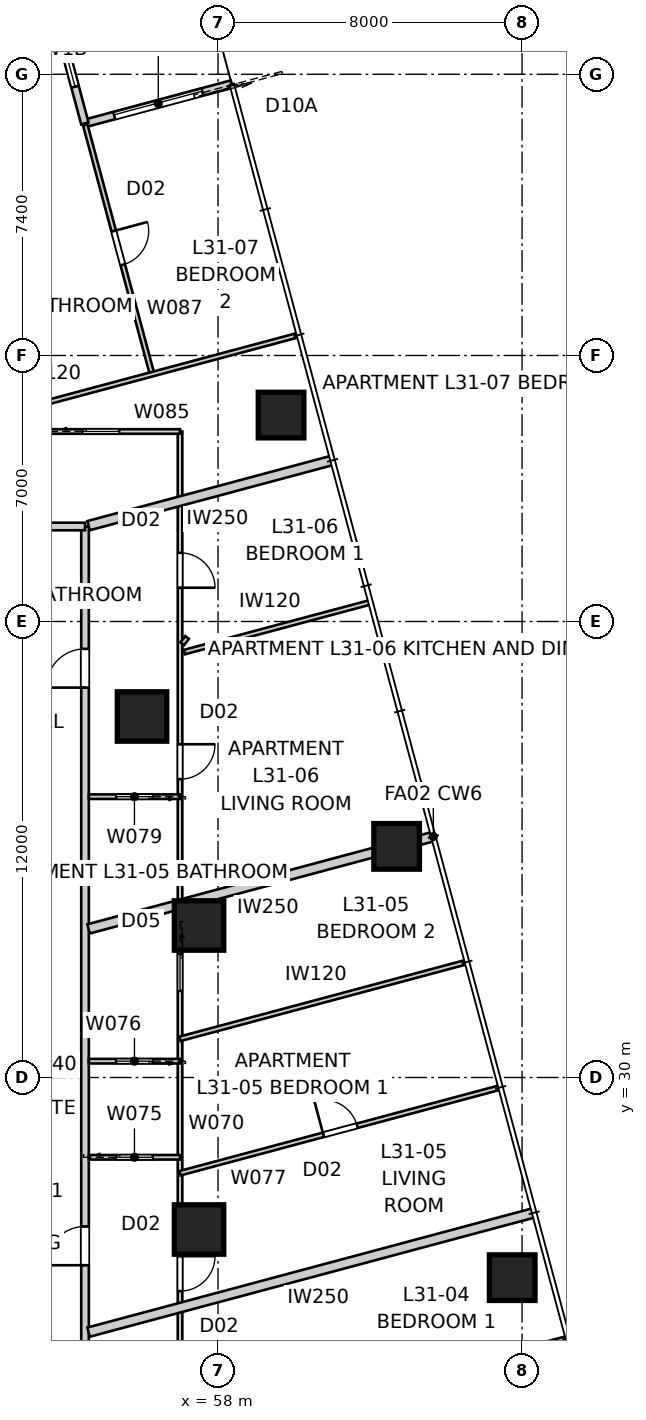
"""IFC4 building model, lengths in metres.
Left out: names, types, materials, properties, quantities, classifications, styles, units other than length and angle.
Written with IfcOpenShell. Run it as: python <this file> out.ifc"""

import sys

from ifc_helpers import new_model, si_unit, direction, frame, frame_2d, origin, origin_2d, place, context, subcontext, project, spatial, rectangle, extrude, element, fill, save


model = new_model("IFC4")
c1 = context("Model", 3, precision=1e-05, world=origin(), true_north=direction((0.0, 1.0)))
c2 = subcontext(c1, "Body", "Model", "MODEL_VIEW")
j1 = project(units=[si_unit("LENGTHUNIT", "METRE"), si_unit("PLANEANGLEUNIT", "RADIAN")], contexts=[c1])
p1 = place(None, origin())
s1 = spatial("IfcSite", under=j1, at=p1, CompositionType="ELEMENT")
p2 = place(p1, origin())
s2 = spatial("IfcBuilding", under=s1, at=p2, CompositionType="ELEMENT")
p3 = place(p2, frame((0.0, 0.0, 115.0)))
s3 = spatial("IfcBuildingStorey", under=s2, at=p3, CompositionType="ELEMENT", Elevation=115.0)
for number, where, z_axis, x_axis in (
    (1, (65.74, 24.733, 0.0), (0.0, 0.0, 1.0), (1.0, 0.0, 0.0)),
    (2, (62.699, 36.082, 0.0), (0.0, 0.0, 1.0), (1.0, 0.0, 0.0)),
    (3, (59.658, 47.432, 0.0), (0.0, 0.0, 1.0), (1.0, 0.0, 0.0)),
):
    element("IfcColumn", number, at=place(p3, frame(where, z_axis=z_axis, x_axis=x_axis)), inside=s3, PredefinedType="COLUMN", context=c2, shape_type="SweptSolid", body=[
        extrude(rectangle(XDim=1.2, YDim=1.2, at=origin_2d()), origin(), (0.0, 0.0, 1.0), 3.4),
    ])
for number, where, z_axis, x_axis in (
    (4, (57.5, 26.0, 0.0), (0.0, 0.0, 1.0), (1.0, 0.0, 0.0)),
    (5, (57.5, 34.0, 0.0), (0.0, 0.0, 1.0), (1.0, 0.0, 0.0)),
    (6, (56.0, 39.5, 0.0), (0.0, 0.0, 1.0), (1.0, 0.0, 0.0)),
):
    element("IfcColumn", number, at=place(p3, frame(where, z_axis=z_axis, x_axis=x_axis)), inside=s3, PredefinedType="COLUMN", context=c2, shape_type="SweptSolid", body=[
        extrude(rectangle(XDim=1.3, YDim=1.3, at=origin_2d()), origin(), (0.0, 0.0, 1.0), 3.4),
    ])
p4 = place(p3, frame((58.359, 56.143, 0.0), z_axis=(0.0, 0.0, 1.0), x_axis=(-0.965919172068, -0.258843877716, 0.0)))
e7 = element("IfcWall", 7, at=p4, inside=s3, PredefinedType="SOLIDWALL", context=c2, shape_type="SweptSolid", body=[
    extrude(rectangle(XDim=4.0, YDim=0.2, at=frame_2d((2.0, 0.0))), origin(), (0.0, 0.0, 1.0), 3.25),
])
p5 = place(p4, frame((0.8, 0.0, 0.0)))
e8 = element("IfcOpeningElement", 8, at=p5, cuts=e7, PredefinedType="OPENING", context=c2, shape_type="SweptSolid", body=[
    extrude(rectangle(XDim=2.4, YDim=2.1, at=frame_2d((1.2, 1.05))), frame((0.0, 0.11, 0.0), z_axis=(0.0, -1.0, 0.0), x_axis=(1.0, 0.0, 0.0)), (0.0, 0.0, 1.0), 0.22),
])
p6 = place(p3, frame((54.496, 55.107, 0.0), z_axis=(0.0, 0.0, 1.0), x_axis=(-0.258786931944, 0.965934430412, 0.0)))
e9 = element("IfcWall", 9, at=p6, inside=s3, PredefinedType="SOLIDWALL", context=c2, shape_type="SweptSolid", body=[
    extrude(rectangle(XDim=4.0, YDim=0.2, at=frame_2d((2.0, 0.0))), origin(), (0.0, 0.0, 1.0), 3.25),
])
p7 = place(p6, frame((1.0, 0.0, 0.45)))
e10 = element("IfcOpeningElement", 10, at=p7, cuts=e9, PredefinedType="OPENING", context=c2, shape_type="SweptSolid", body=[
    extrude(rectangle(XDim=2.0, YDim=1.8, at=frame_2d((1.0, 0.9))), frame((0.0, 0.11, 0.0), z_axis=(0.0, -1.0, 0.0), x_axis=(1.0, 0.0, 0.0)), (0.0, 0.0, 1.0), 0.22),
])
p8 = place(p3, frame((54.5, 15.5, 0.0), z_axis=(0.0, 0.0, 1.0), x_axis=(0.0, 1.0, 0.0)))
e11 = element("IfcWall", 11, at=p8, inside=s3, PredefinedType="PARTITIONING", context=c2, shape_type="SweptSolid", body=[
    extrude(rectangle(XDim=29.0, YDim=0.2, at=frame_2d((14.5, 0.0))), origin(), (0.0, 0.0, 1.0), 3.25),
])
p9 = place(p8, frame((24.76, 0.0, 0.0)))
e12 = element("IfcOpeningElement", 12, at=p9, cuts=e11, PredefinedType="OPENING", context=c2, shape_type="SweptSolid", body=[
    extrude(rectangle(XDim=1.02, YDim=2.1, at=frame_2d((0.51, 1.05))), frame((0.0, 0.11, 0.0), z_axis=(0.0, -1.0, 0.0), x_axis=(1.0, 0.0, 0.0)), (0.0, 0.0, 1.0), 0.22),
])
p10 = place(p8, frame((5.829, 0.0, 0.0)))
e13 = element("IfcOpeningElement", 13, at=p10, cuts=e11, PredefinedType="OPENING", context=c2, shape_type="SweptSolid", body=[
    extrude(rectangle(XDim=1.02, YDim=2.34, at=frame_2d((0.51, 1.17))), frame((0.0, 0.11, 0.0), z_axis=(0.0, -1.0, 0.0), x_axis=(1.0, 0.0, 0.0)), (0.0, 0.0, 1.0), 0.22),
])
p11 = place(p8, frame((9.559, 0.0, 0.0)))
e14 = element("IfcOpeningElement", 14, at=p11, cuts=e11, PredefinedType="OPENING", context=c2, shape_type="SweptSolid", body=[
    extrude(rectangle(XDim=1.02, YDim=2.34, at=frame_2d((0.51, 1.17))), frame((0.0, 0.11, 0.0), z_axis=(0.0, -1.0, 0.0), x_axis=(1.0, 0.0, 0.0)), (0.0, 0.0, 1.0), 0.22),
])
p12 = place(p3, frame((54.5, 44.5, 0.0), z_axis=(0.0, 0.0, 1.0), x_axis=(-1.0, 0.0, 0.0)))
e15 = element("IfcWall", 15, at=p12, inside=s3, PredefinedType="PARTITIONING", context=c2, shape_type="SweptSolid", body=[
    extrude(rectangle(XDim=28.2, YDim=0.2, at=frame_2d((14.1, 0.0))), origin(), (0.0, 0.0, 1.0), 3.25),
])
p13 = place(p12, frame((10.837, 0.0, 0.0)))
e16 = element("IfcOpeningElement", 16, at=p13, cuts=e15, PredefinedType="OPENING", context=c2, shape_type="SweptSolid", body=[
    extrude(rectangle(XDim=1.02, YDim=2.34, at=frame_2d((0.51, 1.17))), frame((0.0, 0.11, 0.0), z_axis=(0.0, -1.0, 0.0), x_axis=(1.0, 0.0, 0.0)), (0.0, 0.0, 1.0), 0.22),
])
p14 = place(p12, frame((5.7, 0.0, 0.0)))
e17 = element("IfcOpeningElement", 17, at=p14, cuts=e15, PredefinedType="OPENING", context=c2, shape_type="SweptSolid", body=[
    extrude(rectangle(XDim=1.02, YDim=2.34, at=frame_2d((0.51, 1.17))), frame((0.0, 0.11, 0.0), z_axis=(0.0, -1.0, 0.0), x_axis=(1.0, 0.0, 0.0)), (0.0, 0.0, 1.0), 0.22),
])
p15 = place(p12, frame((26.127, 0.0, 0.0)))
e18 = element("IfcOpeningElement", 18, at=p15, cuts=e15, PredefinedType="OPENING", context=c2, shape_type="SweptSolid", body=[
    extrude(rectangle(XDim=1.02, YDim=2.34, at=frame_2d((0.51, 1.17))), frame((0.0, 0.11, 0.0), z_axis=(0.0, -1.0, 0.0), x_axis=(1.0, 0.0, 0.0)), (0.0, 0.0, 1.0), 0.22),
])
p16 = place(p3, frame((63.665, 36.341, 0.0), z_axis=(0.0, 0.0, 1.0), x_axis=(-0.965927049013, -0.258814481793, 0.0)))
e19 = element("IfcWall", 19, at=p16, inside=s3, PredefinedType="PARTITIONING", context=c2, shape_type="SweptSolid", body=[
    extrude(rectangle(XDim=9.392, YDim=0.25, at=frame_2d((4.696, 0.0))), origin(), (0.0, 0.0, 1.0), 3.25),
])
p17 = place(p3, frame((66.318, 26.44, 0.0), z_axis=(0.0, 0.0, 1.0), x_axis=(-0.965924438766, -0.258824223352, 0.0)))
e20 = element("IfcWall", 20, at=p17, inside=s3, PredefinedType="PARTITIONING", context=c2, shape_type="SweptSolid", body=[
    extrude(rectangle(XDim=12.138, YDim=0.25, at=frame_2d((6.069, 0.0))), origin(), (0.0, 0.0, 1.0), 3.25),
])
p18 = place(p3, frame((61.012, 46.242, 0.0), z_axis=(0.0, 0.0, 1.0), x_axis=(-0.965929355837, -0.25880587229, 0.0)))
e21 = element("IfcWall", 21, at=p18, inside=s3, PredefinedType="PARTITIONING", context=c2, shape_type="SweptSolid", body=[
    extrude(rectangle(XDim=6.645, YDim=0.25, at=frame_2d((3.322, 0.0))), origin(), (0.0, 0.0, 1.0), 3.25),
])
p19 = place(p3, frame((57.0, 47.0, 0.0), z_axis=(0.0, 0.0, 1.0), x_axis=(0.0, -1.0, 0.0)))
e22 = element("IfcWall", 22, at=p19, inside=s3, PredefinedType="PARTITIONING", context=c2, shape_type="SweptSolid", body=[
    extrude(rectangle(XDim=34.0, YDim=0.12, at=frame_2d((17.0, 0.0))), origin(), (0.0, 0.0, 1.0), 2.55),
])
p20 = place(p19, frame((8.23, 0.0, 0.0)))
e23 = element("IfcOpeningElement", 23, at=p20, cuts=e22, PredefinedType="OPENING", context=c2, shape_type="SweptSolid", body=[
    extrude(rectangle(XDim=0.92, YDim=2.34, at=frame_2d((0.46, 1.17))), frame((0.0, 0.07, 0.0), z_axis=(0.0, -1.0, 0.0), x_axis=(1.0, 0.0, 0.0)), (0.0, 0.0, 1.0), 0.14),
])
p21 = place(p19, frame((3.192, 0.0, 0.0)))
e24 = element("IfcOpeningElement", 24, at=p21, cuts=e22, PredefinedType="OPENING", context=c2, shape_type="SweptSolid", body=[
    extrude(rectangle(XDim=0.92, YDim=2.34, at=frame_2d((0.46, 1.17))), frame((0.0, 0.07, 0.0), z_axis=(0.0, -1.0, 0.0), x_axis=(1.0, 0.0, 0.0)), (0.0, 0.0, 1.0), 0.14),
])
p22 = place(p19, frame((24.391, 0.0, 0.0)))
e25 = element("IfcOpeningElement", 25, at=p22, cuts=e22, PredefinedType="OPENING", context=c2, shape_type="SweptSolid", body=[
    extrude(rectangle(XDim=0.92, YDim=2.34, at=frame_2d((0.46, 1.17))), frame((0.0, 0.07, 0.0), z_axis=(0.0, -1.0, 0.0), x_axis=(1.0, 0.0, 0.0)), (0.0, 0.0, 1.0), 0.14),
])
p23 = place(p19, frame((21.702, 0.0, 0.0)))
e26 = element("IfcOpeningElement", 26, at=p23, cuts=e22, PredefinedType="OPENING", context=c2, shape_type="SweptSolid", body=[
    extrude(rectangle(XDim=0.92, YDim=2.34, at=frame_2d((0.46, 1.17))), frame((0.0, 0.07, 0.0), z_axis=(0.0, -1.0, 0.0), x_axis=(1.0, 0.0, 0.0)), (0.0, 0.0, 1.0), 0.14),
])
p24 = place(p19, frame((31.459, 0.0, 0.0)))
e27 = element("IfcOpeningElement", 27, at=p24, cuts=e22, PredefinedType="OPENING", context=c2, shape_type="SweptSolid", body=[
    extrude(rectangle(XDim=0.96, YDim=2.1, at=frame_2d((0.48, 1.05))), frame((0.0, 0.07, 0.0), z_axis=(0.0, -1.0, 0.0), x_axis=(1.0, 0.0, 0.0)), (0.0, 0.0, 1.0), 0.14),
])
p25 = place(p19, frame((13.759, 0.0, 0.0)))
e28 = element("IfcOpeningElement", 28, at=p25, cuts=e22, PredefinedType="OPENING", context=c2, shape_type="SweptSolid", body=[
    extrude(rectangle(XDim=0.96, YDim=2.1, at=frame_2d((0.48, 1.05))), frame((0.0, 0.07, 0.0), z_axis=(0.0, -1.0, 0.0), x_axis=(1.0, 0.0, 0.0)), (0.0, 0.0, 1.0), 0.14),
])
p26 = place(p3, frame((57.0, 20.406, 0.0), z_axis=(0.0, 0.0, 1.0), x_axis=(0.9659257847, 0.258819200315, 0.0)))
e29 = element("IfcWall", 29, at=p26, inside=s3, PredefinedType="PARTITIONING", context=c2, shape_type="SweptSolid", body=[
    extrude(rectangle(XDim=10.522, YDim=0.12, at=frame_2d((5.261, 0.0))), origin(), (0.0, 0.0, 1.0), 2.722),
])
p27 = place(p26, frame((4.821, 0.0, 0.0)))
e30 = element("IfcOpeningElement", 30, at=p27, cuts=e29, PredefinedType="OPENING", context=c2, shape_type="SweptSolid", body=[
    extrude(rectangle(XDim=0.92, YDim=2.34, at=frame_2d((0.46, 1.17))), frame((0.0, 0.07, 0.0), z_axis=(0.0, -1.0, 0.0), x_axis=(1.0, 0.0, 0.0)), (0.0, 0.0, 1.0), 0.14),
])
p28 = place(p3, frame((54.6, 27.901, 0.0), z_axis=(0.0, 0.0, 1.0), x_axis=(1.0, 0.0, 0.0)))
e31 = element("IfcWall", 31, at=p28, inside=s3, PredefinedType="PARTITIONING", context=c2, shape_type="SweptSolid", body=[
    extrude(rectangle(XDim=2.4, YDim=0.12, at=frame_2d((1.2, 0.0))), origin(), (0.0, 0.0, 1.0), 3.25),
])
p29 = place(p28, frame((0.72, 0.0, 0.0)))
e32 = element("IfcOpeningElement", 32, at=p29, cuts=e31, PredefinedType="OPENING", context=c2, shape_type="SweptSolid", body=[
    extrude(rectangle(XDim=0.96, YDim=2.1, at=frame_2d((0.48, 1.05))), frame((0.0, 0.07, 0.0), z_axis=(0.0, -1.0, 0.0), x_axis=(1.0, 0.0, 0.0)), (0.0, 0.0, 1.0), 0.14),
])
p30 = place(p3, frame((57.0, 30.43, 0.0), z_axis=(0.0, 0.0, 1.0), x_axis=(-1.0, 0.0, 0.0)))
e33 = element("IfcWall", 33, at=p30, inside=s3, PredefinedType="PARTITIONING", context=c2, shape_type="SweptSolid", body=[
    extrude(rectangle(XDim=2.4, YDim=0.12, at=frame_2d((1.2, 0.0))), origin(), (0.0, 0.0, 1.0), 3.25),
])
p31 = place(p30, frame((0.72, 0.0, 0.0)))
e34 = element("IfcOpeningElement", 34, at=p31, cuts=e33, PredefinedType="OPENING", context=c2, shape_type="SweptSolid", body=[
    extrude(rectangle(XDim=0.96, YDim=2.1, at=frame_2d((0.48, 1.05))), frame((0.0, 0.07, 0.0), z_axis=(0.0, -1.0, 0.0), x_axis=(1.0, 0.0, 0.0)), (0.0, 0.0, 1.0), 0.14),
])
p32 = place(p3, frame((57.0, 27.481, 0.0), z_axis=(0.0, 0.0, 1.0), x_axis=(0.965925607751, 0.258819860698, 0.0)))
e35 = element("IfcWall", 35, at=p32, inside=s3, PredefinedType="PARTITIONING", context=c2, shape_type="SweptSolid", body=[
    extrude(rectangle(XDim=8.691, YDim=0.12, at=frame_2d((4.346, 0.0))), origin(), (0.0, 0.0, 1.0), 3.25),
])
p33 = place(p32, frame((3.906, 0.0, 0.0)))
e36 = element("IfcOpeningElement", 36, at=p33, cuts=e35, PredefinedType="OPENING", context=c2, shape_type="SweptSolid", body=[
    extrude(rectangle(XDim=0.92, YDim=2.34, at=frame_2d((0.46, 1.17))), frame((0.0, 0.07, 0.0), z_axis=(0.0, -1.0, 0.0), x_axis=(1.0, 0.0, 0.0)), (0.0, 0.0, 1.0), 0.14),
])
p34 = place(p3, frame((57.0, 31.018, 0.0), z_axis=(0.0, 0.0, 1.0), x_axis=(0.965927309482, 0.258813509689, 0.0)))
e37 = element("IfcWall", 37, at=p34, inside=s3, PredefinedType="PARTITIONING", context=c2, shape_type="SweptSolid", body=[
    extrude(rectangle(XDim=7.776, YDim=0.12, at=frame_2d((3.888, 0.0))), origin(), (0.0, 0.0, 1.0), 3.25),
])
p35 = place(p3, frame((57.0, 37.39, 0.0), z_axis=(0.0, 0.0, 1.0), x_axis=(-1.0, 0.0, 0.0)))
e38 = element("IfcWall", 38, at=p35, inside=s3, PredefinedType="PARTITIONING", context=c2, shape_type="SweptSolid", body=[
    extrude(rectangle(XDim=2.4, YDim=0.12, at=frame_2d((1.2, 0.0))), origin(), (0.0, 0.0, 1.0), 3.25),
])
p36 = place(p35, frame((0.72, 0.0, 0.0)))
e39 = element("IfcOpeningElement", 39, at=p36, cuts=e38, PredefinedType="OPENING", context=c2, shape_type="SweptSolid", body=[
    extrude(rectangle(XDim=0.96, YDim=2.1, at=frame_2d((0.48, 1.05))), frame((0.0, 0.07, 0.0), z_axis=(0.0, -1.0, 0.0), x_axis=(1.0, 0.0, 0.0)), (0.0, 0.0, 1.0), 0.14),
])
p37 = place(p3, frame((57.187, 41.58, 0.0), z_axis=(0.0, 0.0, 1.0), x_axis=(-0.609039064162, -0.793140226142, 0.0)))
e40 = element("IfcWall", 40, at=p37, inside=s3, PredefinedType="PARTITIONING", context=c2, shape_type="SweptSolid", body=[
    extrude(rectangle(XDim=0.211, YDim=0.12, at=frame_2d((0.105, 0.0))), origin(), (0.0, 0.0, 1.0), 3.25),
])
p38 = place(p3, frame((57.116, 41.195, 0.0), z_axis=(0.0, 0.0, 1.0), x_axis=(0.965921615375, 0.258834759935, 0.0)))
e41 = element("IfcWall", 41, at=p38, inside=s3, PredefinedType="PARTITIONING", context=c2, shape_type="SweptSolid", body=[
    extrude(rectangle(XDim=5.029, YDim=0.12, at=frame_2d((2.515, 0.0))), origin(), (0.0, 0.0, 1.0), 2.722),
])
p39 = place(p3, frame((50.853, 47.0, 0.0), z_axis=(0.0, 0.0, 1.0), x_axis=(1.0, 0.0, 0.0)))
e42 = element("IfcWall", 42, at=p39, inside=s3, PredefinedType="PARTITIONING", context=c2, shape_type="SweptSolid", body=[
    extrude(rectangle(XDim=6.147, YDim=0.12, at=frame_2d((3.074, 0.0))), origin(), (0.0, 0.0, 1.0), 3.25),
])
p40 = place(p39, frame((3.585, 0.0, 0.0)))
e43 = element("IfcOpeningElement", 43, at=p40, cuts=e42, PredefinedType="OPENING", context=c2, shape_type="SweptSolid", body=[
    extrude(rectangle(XDim=0.96, YDim=2.1, at=frame_2d((0.48, 1.05))), frame((0.0, 0.07, 0.0), z_axis=(0.0, -1.0, 0.0), x_axis=(1.0, 0.0, 0.0)), (0.0, 0.0, 1.0), 0.14),
])
p41 = place(p3, frame((54.506, 55.069, 0.0), z_axis=(0.0, 0.0, 1.0), x_axis=(0.258830095464, -0.965922865286, 0.0)))
e44 = element("IfcWall", 44, at=p41, inside=s3, PredefinedType="PARTITIONING", context=c2, shape_type="SweptSolid", body=[
    extrude(rectangle(XDim=6.793, YDim=0.12, at=frame_2d((3.396, 0.0))), origin(), (0.0, 0.0, 1.0), 3.25),
])
p42 = place(p41, frame((2.892, 0.0, 0.0)))
e45 = element("IfcOpeningElement", 45, at=p42, cuts=e44, PredefinedType="OPENING", context=c2, shape_type="SweptSolid", body=[
    extrude(rectangle(XDim=0.92, YDim=2.34, at=frame_2d((0.46, 1.17))), frame((0.0, 0.07, 0.0), z_axis=(0.0, -1.0, 0.0), x_axis=(1.0, 0.0, 0.0)), (0.0, 0.0, 1.0), 0.14),
])
p43 = place(p3, frame((60.089, 49.532, 0.0), z_axis=(0.0, 0.0, 1.0), x_axis=(-0.965927203676, -0.25881390457, 0.0)))
e46 = element("IfcWall", 46, at=p43, inside=s3, PredefinedType="PARTITIONING", context=c2, shape_type="SweptSolid", body=[
    extrude(rectangle(XDim=9.357, YDim=0.12, at=frame_2d((4.678, 0.0))), origin(), (0.0, 0.0, 1.0), 2.638),
])
p44 = place(p5, origin())
e47 = element("IfcDoor", 47, at=p44, inside=s3, OperationType="SLIDING_TO_LEFT", PredefinedType="DOOR", context=c2, shape_type="SweptSolid", body=[
    extrude(rectangle(XDim=2.4, YDim=2.1, at=frame_2d((1.2, 1.05))), frame((0.0, 0.025, 0.0), z_axis=(0.0, -1.0, 0.0), x_axis=(1.0, 0.0, 0.0)), (0.0, 0.0, 1.0), 0.05),
])
fill(e8, e47)
p45 = place(p7, origin())
e48 = element("IfcWindow", 48, at=p45, inside=s3, PartitioningType="SINGLE_PANEL", PredefinedType="WINDOW", context=c2, shape_type="SweptSolid", body=[
    extrude(rectangle(XDim=2.0, YDim=1.8, at=frame_2d((1.0, 0.9))), frame((0.0, 0.03, 0.0), z_axis=(0.0, -1.0, 0.0), x_axis=(1.0, 0.0, 0.0)), (0.0, 0.0, 1.0), 0.06),
])
fill(e10, e48)
p46 = place(p9, origin())
e49 = element("IfcDoor", 49, at=p46, inside=s3, OperationType="SINGLE_SWING_LEFT", PredefinedType="DOOR", context=c2, shape_type="SweptSolid", body=[
    extrude(rectangle(XDim=1.02, YDim=2.1, at=frame_2d((0.51, 1.05))), frame((0.0, 0.025, 0.0), z_axis=(0.0, -1.0, 0.0), x_axis=(1.0, 0.0, 0.0)), (0.0, 0.0, 1.0), 0.05),
])
fill(e12, e49)
p47 = place(p11, origin())
e50 = element("IfcDoor", 50, at=p47, inside=s3, OperationType="SINGLE_SWING_LEFT", PredefinedType="DOOR", context=c2, shape_type="SweptSolid", body=[
    extrude(rectangle(XDim=1.02, YDim=2.34, at=frame_2d((0.51, 1.17))), frame((0.0, 0.025, 0.0), z_axis=(0.0, -1.0, 0.0), x_axis=(1.0, 0.0, 0.0)), (0.0, 0.0, 1.0), 0.05),
])
fill(e14, e50)
p48 = place(p20, origin())
e51 = element("IfcDoor", 51, at=p48, inside=s3, OperationType="SINGLE_SWING_LEFT", PredefinedType="DOOR", context=c2, shape_type="SweptSolid", body=[
    extrude(rectangle(XDim=0.92, YDim=2.34, at=frame_2d((0.46, 1.17))), frame((0.0, 0.025, 0.0), z_axis=(0.0, -1.0, 0.0), x_axis=(1.0, 0.0, 0.0)), (0.0, 0.0, 1.0), 0.05),
])
fill(e23, e51)
p49 = place(p21, origin())
e52 = element("IfcDoor", 52, at=p49, inside=s3, OperationType="SINGLE_SWING_RIGHT", PredefinedType="DOOR", context=c2, shape_type="SweptSolid", body=[
    extrude(rectangle(XDim=0.92, YDim=2.34, at=frame_2d((0.46, 1.17))), frame((0.0, 0.025, 0.0), z_axis=(0.0, -1.0, 0.0), x_axis=(1.0, 0.0, 0.0)), (0.0, 0.0, 1.0), 0.05),
])
fill(e24, e52)
p50 = place(p36, origin())
e53 = element("IfcDoor", 53, at=p50, inside=s3, OperationType="SLIDING_TO_LEFT", PredefinedType="DOOR", context=c2, shape_type="SweptSolid", body=[
    extrude(rectangle(XDim=0.96, YDim=2.1, at=frame_2d((0.48, 1.05))), frame((0.0, 0.025, 0.0), z_axis=(0.0, -1.0, 0.0), x_axis=(1.0, 0.0, 0.0)), (0.0, 0.0, 1.0), 0.05),
])
fill(e39, e53)
p51 = place(p23, origin())
e54 = element("IfcDoor", 54, at=p51, inside=s3, OperationType="SINGLE_SWING_LEFT", PredefinedType="DOOR", context=c2, shape_type="SweptSolid", body=[
    extrude(rectangle(XDim=0.92, YDim=2.34, at=frame_2d((0.46, 1.17))), frame((0.0, 0.025, 0.0), z_axis=(0.0, -1.0, 0.0), x_axis=(1.0, 0.0, 0.0)), (0.0, 0.0, 1.0), 0.05),
])
fill(e26, e54)
p52 = place(p29, origin())
e55 = element("IfcDoor", 55, at=p52, inside=s3, OperationType="SLIDING_TO_LEFT", PredefinedType="DOOR", context=c2, shape_type="SweptSolid", body=[
    extrude(rectangle(XDim=0.96, YDim=2.1, at=frame_2d((0.48, 1.05))), frame((0.0, 0.025, 0.0), z_axis=(0.0, -1.0, 0.0), x_axis=(1.0, 0.0, 0.0)), (0.0, 0.0, 1.0), 0.05),
])
fill(e32, e55)
p53 = place(p40, origin())
e56 = element("IfcDoor", 56, at=p53, inside=s3, OperationType="SLIDING_TO_LEFT", PredefinedType="DOOR", context=c2, shape_type="SweptSolid", body=[
    extrude(rectangle(XDim=0.96, YDim=2.1, at=frame_2d((0.48, 1.05))), frame((0.0, 0.025, 0.0), z_axis=(0.0, -1.0, 0.0), x_axis=(1.0, 0.0, 0.0)), (0.0, 0.0, 1.0), 0.05),
])
fill(e43, e56)
p54 = place(p33, origin())
e57 = element("IfcDoor", 57, at=p54, inside=s3, OperationType="SINGLE_SWING_LEFT", PredefinedType="DOOR", context=c2, shape_type="SweptSolid", body=[
    extrude(rectangle(XDim=0.92, YDim=2.34, at=frame_2d((0.46, 1.17))), frame((0.0, 0.025, 0.0), z_axis=(0.0, -1.0, 0.0), x_axis=(1.0, 0.0, 0.0)), (0.0, 0.0, 1.0), 0.05),
])
fill(e36, e57)
p55 = place(p31, origin())
e58 = element("IfcDoor", 58, at=p55, inside=s3, OperationType="SLIDING_TO_LEFT", PredefinedType="DOOR", context=c2, shape_type="SweptSolid", body=[
    extrude(rectangle(XDim=0.96, YDim=2.1, at=frame_2d((0.48, 1.05))), frame((0.0, 0.025, 0.0), z_axis=(0.0, -1.0, 0.0), x_axis=(1.0, 0.0, 0.0)), (0.0, 0.0, 1.0), 0.05),
])
fill(e34, e58)
p56 = place(p25, origin())
e59 = element("IfcDoor", 59, at=p56, inside=s3, OperationType="SLIDING_TO_LEFT", PredefinedType="DOOR", context=c2, shape_type="SweptSolid", body=[
    extrude(rectangle(XDim=0.96, YDim=2.1, at=frame_2d((0.48, 1.05))), frame((0.0, 0.025, 0.0), z_axis=(0.0, -1.0, 0.0), x_axis=(1.0, 0.0, 0.0)), (0.0, 0.0, 1.0), 0.05),
])
fill(e28, e59)
p57 = place(p42, origin())
e60 = element("IfcDoor", 60, at=p57, inside=s3, OperationType="SINGLE_SWING_LEFT", PredefinedType="DOOR", context=c2, shape_type="SweptSolid", body=[
    extrude(rectangle(XDim=0.92, YDim=2.34, at=frame_2d((0.46, 1.17))), frame((0.0, 0.025, 0.0), z_axis=(0.0, -1.0, 0.0), x_axis=(1.0, 0.0, 0.0)), (0.0, 0.0, 1.0), 0.05),
])
fill(e45, e60)
save(model, sys.argv[1])
